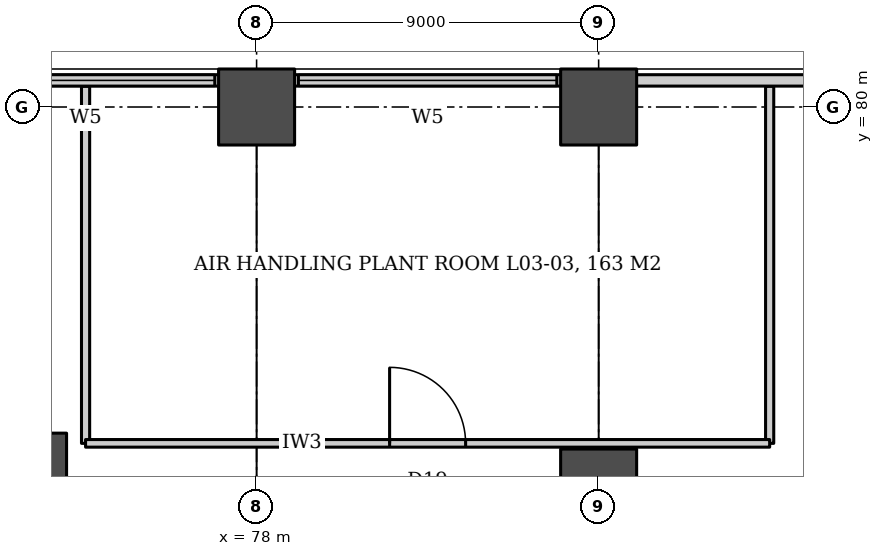
"""IFC4 building model, lengths in metres.
Left out: names, types, materials, properties, quantities, classifications, styles, units other than length and angle.
Written with IfcOpenShell. Run it as: python <this file> out.ifc"""

import sys

from ifc_helpers import new_model, si_unit, direction, frame, frame_2d, origin, origin_2d, place, context, subcontext, project, spatial, rectangle, circle, extrude, element, fill, save


model = new_model("IFC4")
c1 = context("Model", 3, precision=1e-05, world=origin(), true_north=direction((0.0, 1.0)))
c2 = subcontext(c1, "Body", "Model", "MODEL_VIEW")
j1 = project(units=[si_unit("LENGTHUNIT", "METRE"), si_unit("PLANEANGLEUNIT", "RADIAN")], contexts=[c1])
p1 = place(None, origin())
s1 = spatial("IfcSite", under=j1, at=p1, CompositionType="ELEMENT")
p2 = place(p1, origin())
s2 = spatial("IfcBuilding", under=s1, at=p2, CompositionType="ELEMENT")
p3 = place(p2, frame((0.0, 0.0, 20.0)))
s3 = spatial("IfcBuildingStorey", under=s2, at=p3, CompositionType="ELEMENT", Elevation=20.0)
for number, where, z_axis, x_axis in (
    (1, (87.0, 70.0, 0.0), (0.0, 0.0, 1.0), (1.0, 0.0, 0.0)),
    (2, (78.0, 80.0, 0.0), (0.0, 0.0, 1.0), (1.0, 0.0, 0.0)),
    (3, (87.0, 80.0, 0.0), (0.0, 0.0, 1.0), (1.0, 0.0, 0.0)),
):
    element("IfcColumn", number, at=place(p3, frame(where, z_axis=z_axis, x_axis=x_axis)), inside=s3, PredefinedType="COLUMN", context=c2, shape_type="SweptSolid", body=[
        extrude(rectangle(XDim=2.0, YDim=2.0, at=origin_2d()), origin(), (0.0, 0.0, 1.0), 6.0),
    ])
p4 = place(p3, frame((71.5, 69.919, 0.0), z_axis=(0.0, 0.0, 1.0), x_axis=(1.0, 0.0, 0.0)))
e4 = element("IfcColumn", 4, at=p4, inside=s3, PredefinedType="COLUMN", context=c2, shape_type="SweptSolid", body=[
    extrude(circle(Radius=1.5, at=origin_2d()), origin(), (0.0, 0.0, 1.0), 6.0),
])
for number, where, z_axis, x_axis in (
    (5, (73.5, 71.15, 0.0), (0.0, 0.0, 1.0), (0.0, 1.0, 0.0)),
    (6, (91.5, 71.15, 0.0), (0.0, 0.0, 1.0), (0.0, 1.0, 0.0)),
):
    element("IfcWall", number, at=place(p3, frame(where, z_axis=z_axis, x_axis=x_axis)), inside=s3, PredefinedType="PARTITIONING", context=c2, shape_type="SweptSolid", body=[
        extrude(rectangle(XDim=9.395, YDim=0.215, at=frame_2d((4.698, 0.0))), origin(), (0.0, 0.0, 1.0), 2.88),
    ])
p5 = place(p3, frame((73.5, 71.15, 0.0), z_axis=(0.0, 0.0, 1.0), x_axis=(1.0, 0.0, 0.0)))
e7 = element("IfcWall", 7, at=p5, inside=s3, PredefinedType="PARTITIONING", context=c2, shape_type="SweptSolid", body=[
    extrude(rectangle(XDim=18.0, YDim=0.2, at=frame_2d((9.0, 0.0))), origin(), (0.0, 0.0, 1.0), 2.88),
])
p6 = place(p5, frame((8.0, 0.0, 0.0)))
e8 = element("IfcOpeningElement", 8, at=p6, cuts=e7, PredefinedType="OPENING", context=c2, shape_type="SweptSolid", body=[
    extrude(rectangle(XDim=2.0, YDim=2.4, at=frame_2d((1.0, 1.2))), frame((0.0, 0.11, 0.0), z_axis=(0.0, -1.0, 0.0), x_axis=(1.0, 0.0, 0.0)), (0.0, 0.0, 1.0), 0.22),
])
p7 = place(p3, frame((95.0, 80.7, 0.0), z_axis=(0.0, 0.0, 1.0), x_axis=(-1.0, 0.0, 0.0)))
e9 = element("IfcWall", 9, at=p7, inside=s3, PredefinedType="SOLIDWALL", context=c2, shape_type="SweptSolid", body=[
    extrude(rectangle(XDim=70.0, YDim=0.3, at=frame_2d((35.0, 0.0))), origin(), (0.0, 0.0, 1.0), 5.7),
])
p8 = place(p7, frame((54.1, 0.0, 1.8)))
e10 = element("IfcOpeningElement", 10, at=p8, cuts=e9, PredefinedType="OPENING", context=c2, shape_type="SweptSolid", body=[
    extrude(rectangle(XDim=6.8, YDim=2.4, at=frame_2d((3.4, 1.2))), frame((0.0, 0.16, 0.0), z_axis=(0.0, -1.0, 0.0), x_axis=(1.0, 0.0, 0.0)), (0.0, 0.0, 1.0), 0.32),
])
p9 = place(p7, frame((45.1, 0.0, 1.8)))
e11 = element("IfcOpeningElement", 11, at=p9, cuts=e9, PredefinedType="OPENING", context=c2, shape_type="SweptSolid", body=[
    extrude(rectangle(XDim=6.8, YDim=2.4, at=frame_2d((3.4, 1.2))), frame((0.0, 0.16, 0.0), z_axis=(0.0, -1.0, 0.0), x_axis=(1.0, 0.0, 0.0)), (0.0, 0.0, 1.0), 0.32),
])
p10 = place(p7, frame((36.1, 0.0, 1.8)))
e12 = element("IfcOpeningElement", 12, at=p10, cuts=e9, PredefinedType="OPENING", context=c2, shape_type="SweptSolid", body=[
    extrude(rectangle(XDim=6.8, YDim=2.4, at=frame_2d((3.4, 1.2))), frame((0.0, 0.16, 0.0), z_axis=(0.0, -1.0, 0.0), x_axis=(1.0, 0.0, 0.0)), (0.0, 0.0, 1.0), 0.32),
])
p11 = place(p7, frame((27.1, 0.0, 1.8)))
e13 = element("IfcOpeningElement", 13, at=p11, cuts=e9, PredefinedType="OPENING", context=c2, shape_type="SweptSolid", body=[
    extrude(rectangle(XDim=6.8, YDim=2.4, at=frame_2d((3.4, 1.2))), frame((0.0, 0.16, 0.0), z_axis=(0.0, -1.0, 0.0), x_axis=(1.0, 0.0, 0.0)), (0.0, 0.0, 1.0), 0.32),
])
p12 = place(p7, frame((18.1, 0.0, 1.8)))
e14 = element("IfcOpeningElement", 14, at=p12, cuts=e9, PredefinedType="OPENING", context=c2, shape_type="SweptSolid", body=[
    extrude(rectangle(XDim=6.8, YDim=2.4, at=frame_2d((3.4, 1.2))), frame((0.0, 0.16, 0.0), z_axis=(0.0, -1.0, 0.0), x_axis=(1.0, 0.0, 0.0)), (0.0, 0.0, 1.0), 0.32),
])
p13 = place(p7, frame((9.1, 0.0, 1.8)))
e15 = element("IfcOpeningElement", 15, at=p13, cuts=e9, PredefinedType="OPENING", context=c2, shape_type="SweptSolid", body=[
    extrude(rectangle(XDim=6.8, YDim=2.4, at=frame_2d((3.4, 1.2))), frame((0.0, 0.16, 0.0), z_axis=(0.0, -1.0, 0.0), x_axis=(1.0, 0.0, 0.0)), (0.0, 0.0, 1.0), 0.32),
])
p14 = place(p6, origin())
e16 = element("IfcDoor", 16, at=p14, inside=s3, OperationType="DOUBLE_DOOR_DOUBLE_SWING", PredefinedType="DOOR", context=c2, shape_type="SweptSolid", body=[
    extrude(rectangle(XDim=2.0, YDim=2.4, at=frame_2d((1.0, 1.2))), frame((0.0, 0.025, 0.0), z_axis=(0.0, -1.0, 0.0), x_axis=(1.0, 0.0, 0.0)), (0.0, 0.0, 1.0), 0.05),
])
fill(e8, e16)
p15 = place(p12, origin())
e17 = element("IfcWindow", 17, at=p15, inside=s3, PartitioningType="SINGLE_PANEL", PredefinedType="WINDOW", context=c2, shape_type="SweptSolid", body=[
    extrude(rectangle(XDim=6.8, YDim=2.4, at=frame_2d((3.4, 1.2))), frame((0.0, 0.03, 0.0), z_axis=(0.0, -1.0, 0.0), x_axis=(1.0, 0.0, 0.0)), (0.0, 0.0, 1.0), 0.06),
])
fill(e14, e17)
p16 = place(p13, origin())
e18 = element("IfcWindow", 18, at=p16, inside=s3, PartitioningType="SINGLE_PANEL", PredefinedType="WINDOW", context=c2, shape_type="SweptSolid", body=[
    extrude(rectangle(XDim=6.8, YDim=2.4, at=frame_2d((3.4, 1.2))), frame((0.0, 0.03, 0.0), z_axis=(0.0, -1.0, 0.0), x_axis=(1.0, 0.0, 0.0)), (0.0, 0.0, 1.0), 0.06),
])
fill(e15, e18)
save(model, sys.argv[1])
